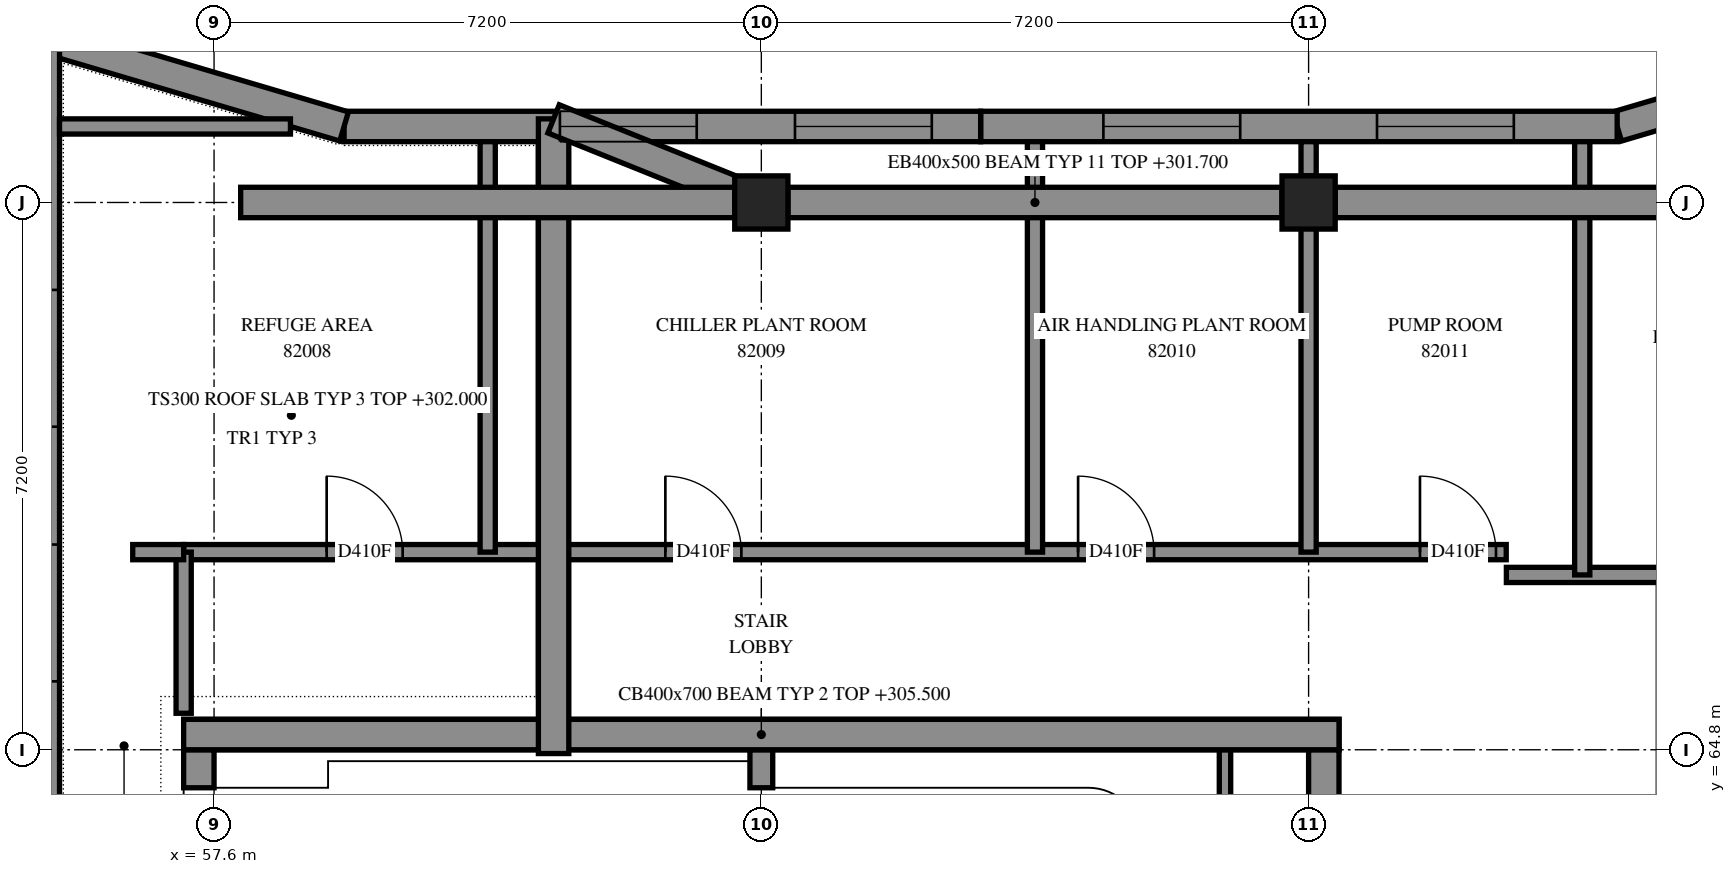
"""IFC4 building model, lengths in metres.
Left out: names, types, materials, properties, quantities, classifications, styles, units other than length and angle.
Written with IfcOpenShell. Run it as: python <this file> out.ifc"""

import sys

from ifc_helpers import new_model, si_unit, direction, frame, frame_2d, origin, origin_2d, place, context, subcontext, project, spatial, polyline, rectangle, outline, extrude, element, fill, save


model = new_model("IFC4")
c1 = context("Model", 3, precision=1e-05, world=origin(), true_north=direction((0.0, 1.0)))
c2 = subcontext(c1, "Body", "Model", "MODEL_VIEW")
j1 = project(units=[si_unit("LENGTHUNIT", "METRE"), si_unit("PLANEANGLEUNIT", "RADIAN")], contexts=[c1])
p1 = place(None, origin())
s1 = spatial("IfcSite", under=j1, at=p1, CompositionType="ELEMENT")
p2 = place(p1, origin())
s2 = spatial("IfcBuilding", under=s1, at=p2, CompositionType="ELEMENT")
p3 = place(p2, frame((0.0, 0.0, 302.0)))
s3 = spatial("IfcBuildingStorey", under=s2, at=p3, CompositionType="ELEMENT", Elevation=302.0)
for number, where, z_axis, x_axis in (
    (1, (64.8, 72.0, 0.0), (0.0, 0.0, 1.0), (1.0, 0.0, 0.0)),
    (2, (72.0, 72.0, 0.0), (0.0, 0.0, 1.0), (1.0, 0.0, 0.0)),
):
    element("IfcColumn", number, at=place(p3, frame(where, z_axis=z_axis, x_axis=x_axis)), inside=s3, PredefinedType="COLUMN", context=c2, shape_type="SweptSolid", body=[
        extrude(rectangle(XDim=0.7, YDim=0.7, at=origin_2d()), origin(), (0.0, 0.0, 1.0), 3.5),
    ])
p4 = place(p3, frame((57.2, 65.0, -0.3), z_axis=(0.0, 0.0, 1.0), x_axis=(1.0, 0.0, 0.0)))
e3 = element("IfcWall", 3, at=p4, inside=s3, PredefinedType="SHEAR", context=c2, shape_type="SweptSolid", body=[
    extrude(outline(polyline([(0.0, 0.0), (15.2, 0.0), (15.2, 3.1), (0.0, 3.1), (0.0, 0.0)])), frame((0.0, 0.2, 0.0), z_axis=(0.0, -1.0, 0.0), x_axis=(1.0, 0.0, 0.0)), (0.0, 0.0, 1.0), 0.4),
])
p5 = place(p3, frame((57.4, 64.3, -0.3), z_axis=(0.0, 0.0, 1.0), x_axis=(0.0, 1.0, 0.0)))
e4 = element("IfcWall", 4, at=p5, inside=s3, PredefinedType="SHEAR", context=c2, shape_type="SweptSolid", body=[
    extrude(outline(polyline([(0.0, 0.0), (0.5, 0.0), (0.5, 3.1), (0.0, 3.1), (0.0, 0.0)])), frame((0.0, 0.2, 0.0), z_axis=(0.0, -1.0, 0.0), x_axis=(1.0, 0.0, 0.0)), (0.0, 0.0, 1.0), 0.4),
])
p6 = place(p3, frame((72.2, 57.1, -0.3), z_axis=(0.0, 0.0, 1.0), x_axis=(0.0, 1.0, 0.0)))
e5 = element("IfcWall", 5, at=p6, inside=s3, PredefinedType="SHEAR", context=c2, shape_type="SweptSolid", body=[
    extrude(outline(polyline([(0.0, 0.0), (7.7, 0.0), (7.7, 3.1), (0.0, 3.1), (0.0, 0.0)])), frame((0.0, 0.2, 0.0), z_axis=(0.0, -1.0, 0.0), x_axis=(1.0, 0.0, 0.0)), (0.0, 0.0, 1.0), 0.4),
])
p7 = place(p6, frame((4.65, 0.0, 0.3)))
e6 = element("IfcOpeningElement", 6, at=p7, cuts=e5, PredefinedType="OPENING", context=c2, shape_type="SweptSolid", body=[
    extrude(rectangle(XDim=1.1, YDim=2.1, at=frame_2d((0.55, 1.05))), frame((0.0, 0.21, 0.0), z_axis=(0.0, -1.0, 0.0), x_axis=(1.0, 0.0, 0.0)), (0.0, 0.0, 1.0), 0.42),
])
p8 = place(p3, frame((64.8, 64.3, 0.0), z_axis=(0.0, 0.0, 1.0), x_axis=(0.0, 1.0, 0.0)))
e7 = element("IfcWall", 7, at=p8, inside=s3, PredefinedType="SOLIDWALL", context=c2, shape_type="SweptSolid", body=[
    extrude(outline(polyline([(0.0, 0.0), (0.5, 0.0), (0.5, 3.5), (0.0, 3.5), (0.0, 0.0)])), frame((0.0, 0.15, 0.0), z_axis=(0.0, -1.0, 0.0), x_axis=(1.0, 0.0, 0.0)), (0.0, 0.0, 1.0), 0.3),
])
p9 = place(p3, frame((80.094, 74.192, 0.0), z_axis=(0.0, 0.0, 1.0), x_axis=(-0.9590112491, -0.2833680012, 0.0)))
e8 = element("IfcWall", 8, at=p9, inside=s3, PredefinedType="SOLIDWALL", context=c2, shape_type="SweptSolid", body=[
    extrude(outline(polyline([(-0.173, -0.2), (4.178, -0.2), (4.236, 0.2), (0.173, 0.2), (-0.173, -0.2)])), origin(), (0.0, 0.0, 1.0), 3.5),
])
p10 = place(p9, frame((1.57, 0.0, 0.7)))
e9 = element("IfcOpeningElement", 9, at=p10, cuts=e8, PredefinedType="OPENING", context=c2, shape_type="SweptSolid", body=[
    extrude(rectangle(XDim=1.8, YDim=2.2, at=frame_2d((0.9, 1.1))), frame((0.0, 0.21, 0.0), z_axis=(0.0, -1.0, 0.0), x_axis=(1.0, 0.0, 0.0)), (0.0, 0.0, 1.0), 0.42),
])
p11 = place(p3, frame((76.06, 73.0, 0.0), z_axis=(0.0, 0.0, 1.0), x_axis=(-1.0, 0.0, 0.0)))
e10 = element("IfcWall", 10, at=p11, inside=s3, PredefinedType="SOLIDWALL", context=c2, shape_type="SweptSolid", body=[
    extrude(outline(polyline([(0.029, -0.2), (8.374, -0.2), (8.374, 0.2), (-0.029, 0.2), (0.029, -0.2)])), origin(), (0.0, 0.0, 1.0), 3.0),
])
p12 = place(p11, frame((1.36, 0.0, 0.7)))
e11 = element("IfcOpeningElement", 11, at=p12, cuts=e10, PredefinedType="OPENING", context=c2, shape_type="SweptSolid", body=[
    extrude(rectangle(XDim=1.8, YDim=2.2, at=frame_2d((0.9, 1.1))), frame((0.0, 0.21, 0.0), z_axis=(0.0, -1.0, 0.0), x_axis=(1.0, 0.0, 0.0)), (0.0, 0.0, 1.0), 0.42),
])
p13 = place(p11, frame((4.96, 0.0, 0.7)))
e12 = element("IfcOpeningElement", 12, at=p13, cuts=e10, PredefinedType="OPENING", context=c2, shape_type="SweptSolid", body=[
    extrude(rectangle(XDim=1.8, YDim=2.2, at=frame_2d((0.9, 1.1))), frame((0.0, 0.21, 0.0), z_axis=(0.0, -1.0, 0.0), x_axis=(1.0, 0.0, 0.0)), (0.0, 0.0, 1.0), 0.42),
])
p14 = place(p3, frame((67.685, 73.0, 0.0), z_axis=(0.0, 0.0, 1.0), x_axis=(-1.0, 0.0, 0.0)))
e13 = element("IfcWall", 13, at=p14, inside=s3, PredefinedType="SOLIDWALL", context=c2, shape_type="SweptSolid", body=[
    extrude(outline(polyline([(0.0, -0.2), (8.345, -0.2), (8.403, 0.2), (0.0, 0.2), (0.0, -0.2)])), origin(), (0.0, 0.0, 1.0), 3.5),
])
p15 = place(p14, frame((0.643, 0.0, 0.7)))
e14 = element("IfcOpeningElement", 14, at=p15, cuts=e13, PredefinedType="OPENING", context=c2, shape_type="SweptSolid", body=[
    extrude(rectangle(XDim=1.8, YDim=2.2, at=frame_2d((0.9, 1.1))), frame((0.0, 0.21, 0.0), z_axis=(0.0, -1.0, 0.0), x_axis=(1.0, 0.0, 0.0)), (0.0, 0.0, 1.0), 0.42),
])
p16 = place(p14, frame((3.735, 0.0, 0.7)))
e15 = element("IfcOpeningElement", 15, at=p16, cuts=e13, PredefinedType="OPENING", context=c2, shape_type="SweptSolid", body=[
    extrude(rectangle(XDim=1.8, YDim=2.2, at=frame_2d((0.9, 1.1))), frame((0.0, 0.21, 0.0), z_axis=(0.0, -1.0, 0.0), x_axis=(1.0, 0.0, 0.0)), (0.0, 0.0, 1.0), 0.42),
])
p17 = place(p3, frame((59.311, 73.0, 0.0), z_axis=(0.0, 0.0, 1.0), x_axis=(-0.9590053928, 0.2833878201, 0.0)))
e16 = element("IfcWall", 16, at=p17, inside=s3, PredefinedType="SOLIDWALL", context=c2, shape_type="SweptSolid", body=[
    extrude(outline(polyline([(0.029, -0.2), (4.38, -0.2), (3.845, 0.2), (-0.029, 0.2), (0.029, -0.2)])), origin(), (0.0, 0.0, 1.0), 3.5),
])
p18 = place(p3, frame((55.367, 74.165, 0.0), z_axis=(0.0, 0.0, 1.0), x_axis=(0.0, -1.0, 0.0)))
e17 = element("IfcWall", 17, at=p18, inside=s3, PredefinedType="SOLIDWALL", context=c2, shape_type="SweptSolid", body=[
    extrude(outline(polyline([(-0.268, -0.2), (10.565, -0.2), (10.165, 0.2), (0.268, 0.2), (-0.268, -0.2)])), origin(), (0.0, 0.0, 1.0), 3.5),
])
p19 = place(p18, frame((3.315, 0.0, 0.7)))
e18 = element("IfcOpeningElement", 18, at=p19, cuts=e17, PredefinedType="OPENING", context=c2, shape_type="SweptSolid", body=[
    extrude(rectangle(XDim=1.8, YDim=2.2, at=frame_2d((0.9, 1.1))), frame((0.0, 0.21, 0.0), z_axis=(0.0, -1.0, 0.0), x_axis=(1.0, 0.0, 0.0)), (0.0, 0.0, 1.0), 0.42),
])
p20 = place(p18, frame((6.665, 0.0, 0.7)))
e19 = element("IfcOpeningElement", 19, at=p20, cuts=e17, PredefinedType="OPENING", context=c2, shape_type="SweptSolid", body=[
    extrude(rectangle(XDim=1.8, YDim=2.2, at=frame_2d((0.9, 1.1))), frame((0.0, 0.21, 0.0), z_axis=(0.0, -1.0, 0.0), x_axis=(1.0, 0.0, 0.0)), (0.0, 0.0, 1.0), 0.42),
])
p21 = place(p3, frame((61.967, 65.5, 0.0), z_axis=(0.0, 0.0, 1.0), x_axis=(0.0, 1.0, 0.0)))
e20 = element("IfcWall", 20, at=p21, inside=s3, PredefinedType="PARAPET", context=c2, shape_type="SweptSolid", body=[
    extrude(outline(polyline([(0.0, -0.1), (7.3, -0.1), (7.3, 0.1), (0.0, 0.1), (0.0, -0.1)])), origin(), (0.0, 0.0, 1.0), 0.25),
])
p22 = place(p3, frame((70.9, 63.78, 0.0), z_axis=(0.0, 0.0, 1.0), x_axis=(0.0, 1.0, 0.0)))
e21 = element("IfcWall", 21, at=p22, inside=s3, PredefinedType="PARTITIONING", context=c2, shape_type="SweptSolid", body=[
    extrude(outline(polyline([(0.0, 0.0), (1.02, 0.0), (1.02, 3.5), (0.0, 3.5), (0.0, 0.0)])), frame((0.0, 0.075, 0.0), z_axis=(0.0, -1.0, 0.0), x_axis=(1.0, 0.0, 0.0)), (0.0, 0.0, 1.0), 0.15),
])
p23 = place(p3, frame((57.2, 67.4, 0.0), z_axis=(0.0, 0.0, 1.0), x_axis=(1.0, 0.0, 0.0)))
e22 = element("IfcWall", 22, at=p23, inside=s3, PredefinedType="PARTITIONING", context=c2, shape_type="SweptSolid", body=[
    extrude(rectangle(XDim=17.4, YDim=0.2, at=frame_2d((8.7, 0.0))), origin(), (0.0, 0.0, 1.0), 3.5),
])
p24 = place(p23, frame((1.881, 0.0, 0.0)))
e23 = element("IfcOpeningElement", 23, at=p24, cuts=e22, PredefinedType="OPENING", context=c2, shape_type="SweptSolid", body=[
    extrude(rectangle(XDim=1.0, YDim=2.1, at=frame_2d((0.5, 1.05))), frame((0.0, 0.11, 0.0), z_axis=(0.0, -1.0, 0.0), x_axis=(1.0, 0.0, 0.0)), (0.0, 0.0, 1.0), 0.22),
])
p25 = place(p23, frame((6.338, 0.0, 0.0)))
e24 = element("IfcOpeningElement", 24, at=p25, cuts=e22, PredefinedType="OPENING", context=c2, shape_type="SweptSolid", body=[
    extrude(rectangle(XDim=1.0, YDim=2.1, at=frame_2d((0.5, 1.05))), frame((0.0, 0.11, 0.0), z_axis=(0.0, -1.0, 0.0), x_axis=(1.0, 0.0, 0.0)), (0.0, 0.0, 1.0), 0.22),
])
p26 = place(p23, frame((11.768, 0.0, 0.0)))
e25 = element("IfcOpeningElement", 25, at=p26, cuts=e22, PredefinedType="OPENING", context=c2, shape_type="SweptSolid", body=[
    extrude(rectangle(XDim=1.0, YDim=2.1, at=frame_2d((0.5, 1.05))), frame((0.0, 0.11, 0.0), z_axis=(0.0, -1.0, 0.0), x_axis=(1.0, 0.0, 0.0)), (0.0, 0.0, 1.0), 0.22),
])
p27 = place(p23, frame((16.265, 0.0, 0.0)))
e26 = element("IfcOpeningElement", 26, at=p27, cuts=e22, PredefinedType="OPENING", context=c2, shape_type="SweptSolid", body=[
    extrude(rectangle(XDim=1.0, YDim=2.1, at=frame_2d((0.5, 1.05))), frame((0.0, 0.11, 0.0), z_axis=(0.0, -1.0, 0.0), x_axis=(1.0, 0.0, 0.0)), (0.0, 0.0, 1.0), 0.22),
])
p28 = place(p3, frame((72.0, 67.4, 0.0), z_axis=(0.0, 0.0, 1.0), x_axis=(0.0, 1.0, 0.0)))
e27 = element("IfcWall", 27, at=p28, inside=s3, PredefinedType="PARTITIONING", context=c2, shape_type="SweptSolid", body=[
    extrude(rectangle(XDim=4.95, YDim=0.2, at=frame_2d((2.475, 0.0))), origin(), (0.0, 0.0, 1.0), 3.5),
])
p29 = place(p3, frame((57.2, 65.28, 0.0), z_axis=(0.0, 0.0, 1.0), x_axis=(0.0, 1.0, 0.0)))
e28 = element("IfcWall", 28, at=p29, inside=s3, PredefinedType="PARTITIONING", context=c2, shape_type="SweptSolid", body=[
    extrude(rectangle(XDim=2.12, YDim=0.2, at=frame_2d((1.06, 0.0))), origin(), (0.0, 0.0, 1.0), 3.5),
])
p30 = place(p3, frame((74.602, 67.1, 0.0), z_axis=(0.0, 0.0, 1.0), x_axis=(1.0, 0.0, 0.0)))
e29 = element("IfcWall", 29, at=p30, inside=s3, PredefinedType="PARTITIONING", context=c2, shape_type="SweptSolid", body=[
    extrude(rectangle(XDim=2.098, YDim=0.2, at=frame_2d((1.049, 0.0))), origin(), (0.0, 0.0, 1.0), 3.5),
])
p31 = place(p3, frame((56.53, 67.4, 0.0), z_axis=(0.0, 0.0, 1.0), x_axis=(1.0, 0.0, 0.0)))
e30 = element("IfcWall", 30, at=p31, inside=s3, PredefinedType="PARTITIONING", context=c2, shape_type="SweptSolid", body=[
    extrude(rectangle(XDim=0.67, YDim=0.2, at=frame_2d((0.335, 0.0))), origin(), (0.0, 0.0, 1.0), 3.5),
])
p32 = place(p3, frame((55.567, 73.0, 0.0), z_axis=(0.0, 0.0, 1.0), x_axis=(1.0, 0.0, 0.0)))
e31 = element("IfcWall", 31, at=p32, inside=s3, PredefinedType="PARTITIONING", context=c2, shape_type="SweptSolid", body=[
    extrude(outline(polyline([(0.0, -0.1), (3.038, -0.1), (3.038, 0.1), (0.0, 0.1), (0.0, -0.1)])), origin(), (0.0, 0.0, 1.0), 3.5),
])
p33 = place(p3, frame((75.6, 67.1, 0.0), z_axis=(0.0, 0.0, 1.0), x_axis=(0.0, 1.0, 0.0)))
e32 = element("IfcWall", 32, at=p33, inside=s3, PredefinedType="PARTITIONING", context=c2, shape_type="SweptSolid", body=[
    extrude(outline(polyline([(0.0, -0.1), (5.7, -0.1), (5.7, 0.1), (0.0, 0.1), (0.0, -0.1)])), origin(), (0.0, 0.0, 1.0), 3.5),
])
for number, where, z_axis, x_axis in (
    (33, (61.2, 67.4, 0.0), (0.0, 0.0, 1.0), (0.0, 1.0, 0.0)),
    (34, (68.4, 67.4, 0.0), (0.0, 0.0, 1.0), (0.0, 1.0, 0.0)),
):
    element("IfcWall", number, at=place(p3, frame(where, z_axis=z_axis, x_axis=x_axis)), inside=s3, PredefinedType="PARTITIONING", context=c2, shape_type="SweptSolid", body=[
        extrude(outline(polyline([(0.0, -0.1), (5.4, -0.1), (5.4, 0.1), (0.0, 0.1), (0.0, -0.1)])), origin(), (0.0, 0.0, 1.0), 3.5),
    ])
p34 = place(p3, frame((72.0, 72.35, 0.0), z_axis=(0.0, 0.0, 1.0), x_axis=(0.0, 1.0, 0.0)))
e35 = element("IfcWall", 35, at=p34, inside=s3, PredefinedType="PARTITIONING", context=c2, shape_type="SweptSolid", body=[
    extrude(outline(polyline([(0.0, -0.1), (0.45, -0.1), (0.45, 0.1), (0.0, 0.1), (0.0, -0.1)])), origin(), (0.0, 0.0, 1.0), 3.5),
])
p35 = place(p12, origin())
e36 = element("IfcWindow", 36, at=p35, inside=s3, PartitioningType="SINGLE_PANEL", PredefinedType="WINDOW", context=c2, shape_type="SweptSolid", body=[
    extrude(rectangle(XDim=1.8, YDim=2.2, at=frame_2d((0.9, 1.1))), frame((0.0, 0.08, 0.0), z_axis=(0.0, -1.0, 0.0), x_axis=(1.0, 0.0, 0.0)), (0.0, 0.0, 1.0), 0.06),
])
fill(e11, e36)
p36 = place(p13, origin())
e37 = element("IfcWindow", 37, at=p36, inside=s3, PartitioningType="SINGLE_PANEL", PredefinedType="WINDOW", context=c2, shape_type="SweptSolid", body=[
    extrude(rectangle(XDim=1.8, YDim=2.2, at=frame_2d((0.9, 1.1))), frame((0.0, 0.08, 0.0), z_axis=(0.0, -1.0, 0.0), x_axis=(1.0, 0.0, 0.0)), (0.0, 0.0, 1.0), 0.06),
])
fill(e12, e37)
p37 = place(p15, origin())
e38 = element("IfcWindow", 38, at=p37, inside=s3, PartitioningType="SINGLE_PANEL", PredefinedType="WINDOW", context=c2, shape_type="SweptSolid", body=[
    extrude(rectangle(XDim=1.8, YDim=2.2, at=frame_2d((0.9, 1.1))), frame((0.0, 0.08, 0.0), z_axis=(0.0, -1.0, 0.0), x_axis=(1.0, 0.0, 0.0)), (0.0, 0.0, 1.0), 0.06),
])
fill(e14, e38)
p38 = place(p16, origin())
e39 = element("IfcWindow", 39, at=p38, inside=s3, PartitioningType="SINGLE_PANEL", PredefinedType="WINDOW", context=c2, shape_type="SweptSolid", body=[
    extrude(rectangle(XDim=1.8, YDim=2.2, at=frame_2d((0.9, 1.1))), frame((0.0, 0.08, 0.0), z_axis=(0.0, -1.0, 0.0), x_axis=(1.0, 0.0, 0.0)), (0.0, 0.0, 1.0), 0.06),
])
fill(e15, e39)
p39 = place(p24, origin())
e40 = element("IfcDoor", 40, at=p39, inside=s3, OperationType="SINGLE_SWING_RIGHT", PredefinedType="DOOR", context=c2, shape_type="SweptSolid", body=[
    extrude(rectangle(XDim=1.0, YDim=2.1, at=frame_2d((0.5, 1.05))), frame((0.0, 0.025, 0.0), z_axis=(0.0, -1.0, 0.0), x_axis=(1.0, 0.0, 0.0)), (0.0, 0.0, 1.0), 0.05),
])
fill(e23, e40)
p40 = place(p25, origin())
e41 = element("IfcDoor", 41, at=p40, inside=s3, OperationType="SINGLE_SWING_LEFT", PredefinedType="DOOR", context=c2, shape_type="SweptSolid", body=[
    extrude(rectangle(XDim=1.0, YDim=2.1, at=frame_2d((0.5, 1.05))), frame((0.0, 0.025, 0.0), z_axis=(0.0, -1.0, 0.0), x_axis=(1.0, 0.0, 0.0)), (0.0, 0.0, 1.0), 0.05),
])
fill(e24, e41)
p41 = place(p26, origin())
e42 = element("IfcDoor", 42, at=p41, inside=s3, OperationType="SINGLE_SWING_LEFT", PredefinedType="DOOR", context=c2, shape_type="SweptSolid", body=[
    extrude(rectangle(XDim=1.0, YDim=2.1, at=frame_2d((0.5, 1.05))), frame((0.0, 0.025, 0.0), z_axis=(0.0, -1.0, 0.0), x_axis=(1.0, 0.0, 0.0)), (0.0, 0.0, 1.0), 0.05),
])
fill(e25, e42)
p42 = place(p27, origin())
e43 = element("IfcDoor", 43, at=p42, inside=s3, OperationType="SINGLE_SWING_RIGHT", PredefinedType="DOOR", context=c2, shape_type="SweptSolid", body=[
    extrude(rectangle(XDim=1.0, YDim=2.1, at=frame_2d((0.5, 1.05))), frame((0.0, 0.025, 0.0), z_axis=(0.0, -1.0, 0.0), x_axis=(1.0, 0.0, 0.0)), (0.0, 0.0, 1.0), 0.05),
])
fill(e26, e43)
save(model, sys.argv[1])
